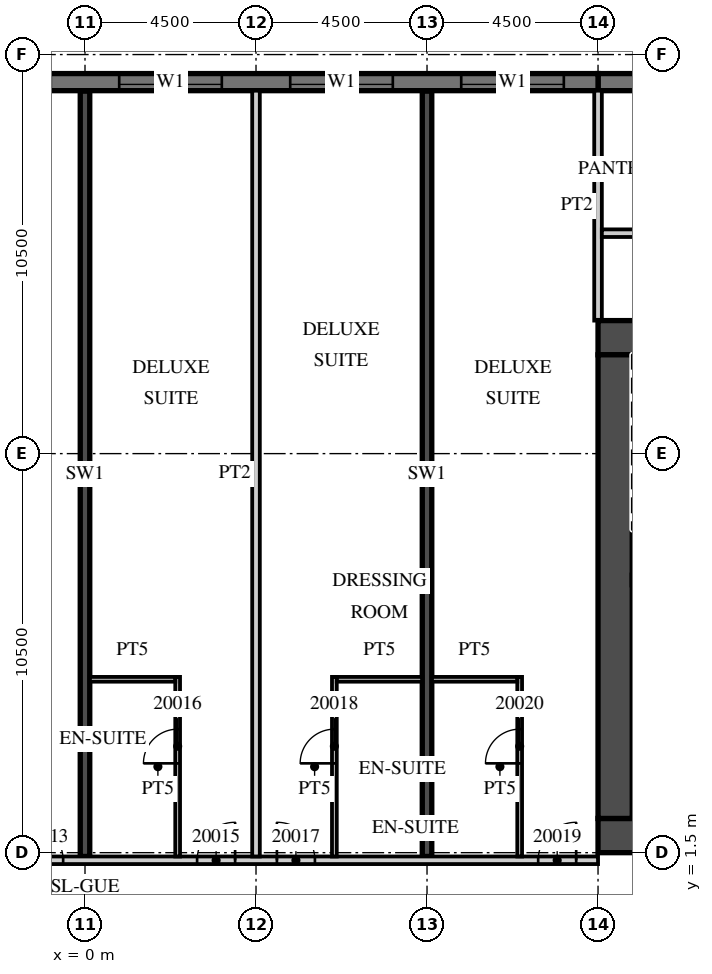
"""IFC4 building model, lengths in metres.
Left out: names, types, materials, properties, quantities, classifications, styles, units other than length and angle.
Written with IfcOpenShell. Run it as: python <this file> out.ifc"""

import sys

from ifc_helpers import new_model, si_unit, direction, frame, frame_2d, origin, place, context, subcontext, project, spatial, rectangle, extrude, element, fill, save


model = new_model("IFC4")
c1 = context("Model", 3, precision=1e-05, world=origin(), true_north=direction((0.0, 1.0)))
c2 = subcontext(c1, "Body", "Model", "MODEL_VIEW")
j1 = project(units=[si_unit("LENGTHUNIT", "METRE"), si_unit("PLANEANGLEUNIT", "RADIAN")], contexts=[c1])
p1 = place(None, origin())
s1 = spatial("IfcSite", under=j1, at=p1, CompositionType="ELEMENT")
p2 = place(p1, origin())
s2 = spatial("IfcBuilding", under=s1, at=p2, CompositionType="ELEMENT")
p3 = place(p2, frame((0.0, 0.0, 96.3)))
s3 = spatial("IfcBuildingStorey", under=s2, at=p3, CompositionType="ELEMENT", Elevation=96.3)
for number, where, z_axis, x_axis in (
    (1, (0.0, 1.4, 0.0), (0.0, 0.0, 1.0), (0.0, 1.0, 0.0)),
    (2, (9.0, 1.4, 0.0), (0.0, 0.0, 1.0), (0.0, 1.0, 0.0)),
):
    element("IfcWall", number, at=place(p3, frame(where, z_axis=z_axis, x_axis=x_axis)), inside=s3, PredefinedType="SHEAR", context=c2, shape_type="SweptSolid", body=[
        extrude(rectangle(XDim=20.14, YDim=0.25, at=frame_2d((10.07, 0.0))), origin(), (0.0, 0.0, 1.0), 3.0),
    ])
p4 = place(p3, frame((31.5, 21.775, 0.0), z_axis=(0.0, 0.0, 1.0), x_axis=(-1.0, 0.0, 0.0)))
e3 = element("IfcWall", 3, at=p4, inside=s3, PredefinedType="SOLIDWALL", context=c2, shape_type="SweptSolid", body=[
    extrude(rectangle(XDim=18.0, YDim=0.45, at=frame_2d((9.0, 0.0))), origin(), (0.0, 0.0, 1.0), 3.0),
])
p5 = place(p3, frame((13.5, 21.775, 0.0), z_axis=(0.0, 0.0, 1.0), x_axis=(-1.0, 0.0, 0.0)))
e4 = element("IfcWall", 4, at=p5, inside=s3, PredefinedType="SOLIDWALL", context=c2, shape_type="SweptSolid", body=[
    extrude(rectangle(XDim=54.5, YDim=0.45, at=frame_2d((27.25, 0.0))), origin(), (0.0, 0.0, 1.0), 3.0),
])
p6 = place(p5, frame((0.9, 0.0, 0.45)))
e5 = element("IfcOpeningElement", 5, at=p6, cuts=e4, PredefinedType="OPENING", context=c2, shape_type="SweptSolid", body=[
    extrude(rectangle(XDim=2.7, YDim=2.25, at=frame_2d((1.35, 1.125))), frame((0.0, 0.235, 0.0), z_axis=(0.0, -1.0, 0.0), x_axis=(1.0, 0.0, 0.0)), (0.0, 0.0, 1.0), 0.47),
])
p7 = place(p5, frame((5.4, 0.0, 0.45)))
e6 = element("IfcOpeningElement", 6, at=p7, cuts=e4, PredefinedType="OPENING", context=c2, shape_type="SweptSolid", body=[
    extrude(rectangle(XDim=2.7, YDim=2.25, at=frame_2d((1.35, 1.125))), frame((0.0, 0.235, 0.0), z_axis=(0.0, -1.0, 0.0), x_axis=(1.0, 0.0, 0.0)), (0.0, 0.0, 1.0), 0.47),
])
p8 = place(p5, frame((9.9, 0.0, 0.45)))
e7 = element("IfcOpeningElement", 7, at=p8, cuts=e4, PredefinedType="OPENING", context=c2, shape_type="SweptSolid", body=[
    extrude(rectangle(XDim=2.7, YDim=2.25, at=frame_2d((1.35, 1.125))), frame((0.0, 0.235, 0.0), z_axis=(0.0, -1.0, 0.0), x_axis=(1.0, 0.0, 0.0)), (0.0, 0.0, 1.0), 0.47),
])
p9 = place(p5, frame((14.4, 0.0, 0.45)))
e8 = element("IfcOpeningElement", 8, at=p9, cuts=e4, PredefinedType="OPENING", context=c2, shape_type="SweptSolid", body=[
    extrude(rectangle(XDim=2.7, YDim=2.25, at=frame_2d((1.35, 1.125))), frame((0.0, 0.235, 0.0), z_axis=(0.0, -1.0, 0.0), x_axis=(1.0, 0.0, 0.0)), (0.0, 0.0, 1.0), 0.47),
])
p10 = place(p5, frame((18.9, 0.0, 0.45)))
e9 = element("IfcOpeningElement", 9, at=p10, cuts=e4, PredefinedType="OPENING", context=c2, shape_type="SweptSolid", body=[
    extrude(rectangle(XDim=2.7, YDim=2.25, at=frame_2d((1.35, 1.125))), frame((0.0, 0.235, 0.0), z_axis=(0.0, -1.0, 0.0), x_axis=(1.0, 0.0, 0.0)), (0.0, 0.0, 1.0), 0.47),
])
p11 = place(p5, frame((23.4, 0.0, 0.45)))
e10 = element("IfcOpeningElement", 10, at=p11, cuts=e4, PredefinedType="OPENING", context=c2, shape_type="SweptSolid", body=[
    extrude(rectangle(XDim=2.7, YDim=2.25, at=frame_2d((1.35, 1.125))), frame((0.0, 0.235, 0.0), z_axis=(0.0, -1.0, 0.0), x_axis=(1.0, 0.0, 0.0)), (0.0, 0.0, 1.0), 0.47),
])
p12 = place(p5, frame((27.9, 0.0, 0.45)))
e11 = element("IfcOpeningElement", 11, at=p12, cuts=e4, PredefinedType="OPENING", context=c2, shape_type="SweptSolid", body=[
    extrude(rectangle(XDim=2.7, YDim=2.25, at=frame_2d((1.35, 1.125))), frame((0.0, 0.235, 0.0), z_axis=(0.0, -1.0, 0.0), x_axis=(1.0, 0.0, 0.0)), (0.0, 0.0, 1.0), 0.47),
])
p13 = place(p5, frame((32.4, 0.0, 0.45)))
e12 = element("IfcOpeningElement", 12, at=p13, cuts=e4, PredefinedType="OPENING", context=c2, shape_type="SweptSolid", body=[
    extrude(rectangle(XDim=2.7, YDim=2.25, at=frame_2d((1.35, 1.125))), frame((0.0, 0.235, 0.0), z_axis=(0.0, -1.0, 0.0), x_axis=(1.0, 0.0, 0.0)), (0.0, 0.0, 1.0), 0.47),
])
p14 = place(p5, frame((36.9, 0.0, 0.45)))
e13 = element("IfcOpeningElement", 13, at=p14, cuts=e4, PredefinedType="OPENING", context=c2, shape_type="SweptSolid", body=[
    extrude(rectangle(XDim=2.7, YDim=2.25, at=frame_2d((1.35, 1.125))), frame((0.0, 0.235, 0.0), z_axis=(0.0, -1.0, 0.0), x_axis=(1.0, 0.0, 0.0)), (0.0, 0.0, 1.0), 0.47),
])
p15 = place(p5, frame((41.4, 0.0, 0.45)))
e14 = element("IfcOpeningElement", 14, at=p15, cuts=e4, PredefinedType="OPENING", context=c2, shape_type="SweptSolid", body=[
    extrude(rectangle(XDim=2.7, YDim=2.25, at=frame_2d((1.35, 1.125))), frame((0.0, 0.235, 0.0), z_axis=(0.0, -1.0, 0.0), x_axis=(1.0, 0.0, 0.0)), (0.0, 0.0, 1.0), 0.47),
])
p16 = place(p5, frame((45.9, 0.0, 0.45)))
e15 = element("IfcOpeningElement", 15, at=p16, cuts=e4, PredefinedType="OPENING", context=c2, shape_type="SweptSolid", body=[
    extrude(rectangle(XDim=2.7, YDim=2.25, at=frame_2d((1.35, 1.125))), frame((0.0, 0.235, 0.0), z_axis=(0.0, -1.0, 0.0), x_axis=(1.0, 0.0, 0.0)), (0.0, 0.0, 1.0), 0.47),
])
p17 = place(p5, frame((50.4, 0.0, 0.45)))
e16 = element("IfcOpeningElement", 16, at=p17, cuts=e4, PredefinedType="OPENING", context=c2, shape_type="SweptSolid", body=[
    extrude(rectangle(XDim=2.7, YDim=2.25, at=frame_2d((1.35, 1.125))), frame((0.0, 0.235, 0.0), z_axis=(0.0, -1.0, 0.0), x_axis=(1.0, 0.0, 0.0)), (0.0, 0.0, 1.0), 0.47),
])
p18 = place(p3, frame((13.5, 15.5, 0.0), z_axis=(0.0, 0.0, 1.0), x_axis=(0.0, 1.0, 0.0)))
e17 = element("IfcWall", 17, at=p18, inside=s3, PredefinedType="PARTITIONING", context=c2, shape_type="SweptSolid", body=[
    extrude(rectangle(XDim=6.05, YDim=0.2, at=frame_2d((3.025, 0.0))), origin(), (0.0, 0.0, 1.0), 3.0),
])
p19 = place(p3, frame((-44.55, 1.3, 0.0), z_axis=(0.0, 0.0, 1.0), x_axis=(1.0, 0.0, 0.0)))
e18 = element("IfcWall", 18, at=p19, inside=s3, PredefinedType="PARTITIONING", context=c2, shape_type="SweptSolid", body=[
    extrude(rectangle(XDim=58.05, YDim=0.2, at=frame_2d((29.025, 0.0))), origin(), (0.0, 0.0, 1.0), 3.0),
])
p20 = place(p19, frame((0.525, 0.0, 0.0)))
e19 = element("IfcOpeningElement", 19, at=p20, cuts=e18, PredefinedType="OPENING", context=c2, shape_type="SweptSolid", body=[
    extrude(rectangle(XDim=1.0, YDim=2.1, at=frame_2d((0.5, 1.05))), frame((0.0, 0.11, 0.0), z_axis=(0.0, -1.0, 0.0), x_axis=(1.0, 0.0, 0.0)), (0.0, 0.0, 1.0), 0.22),
])
p21 = place(p19, frame((4.625, 0.0, 0.0)))
e20 = element("IfcOpeningElement", 20, at=p21, cuts=e18, PredefinedType="OPENING", context=c2, shape_type="SweptSolid", body=[
    extrude(rectangle(XDim=1.0, YDim=2.1, at=frame_2d((0.5, 1.05))), frame((0.0, 0.11, 0.0), z_axis=(0.0, -1.0, 0.0), x_axis=(1.0, 0.0, 0.0)), (0.0, 0.0, 1.0), 0.22),
])
p22 = place(p19, frame((10.987, 0.0, 0.0)))
e21 = element("IfcOpeningElement", 21, at=p22, cuts=e18, PredefinedType="OPENING", context=c2, shape_type="SweptSolid", body=[
    extrude(rectangle(XDim=1.2, YDim=2.1, at=frame_2d((0.6, 1.05))), frame((0.0, 0.11, 0.0), z_axis=(0.0, -1.0, 0.0), x_axis=(1.0, 0.0, 0.0)), (0.0, 0.0, 1.0), 0.22),
])
p23 = place(p19, frame((22.912, 0.0, 0.0)))
e22 = element("IfcOpeningElement", 22, at=p23, cuts=e18, PredefinedType="OPENING", context=c2, shape_type="SweptSolid", body=[
    extrude(rectangle(XDim=1.2, YDim=2.1, at=frame_2d((0.6, 1.05))), frame((0.0, 0.11, 0.0), z_axis=(0.0, -1.0, 0.0), x_axis=(1.0, 0.0, 0.0)), (0.0, 0.0, 1.0), 0.22),
])
p24 = place(p19, frame((28.987, 0.0, 0.0)))
e23 = element("IfcOpeningElement", 23, at=p24, cuts=e18, PredefinedType="OPENING", context=c2, shape_type="SweptSolid", body=[
    extrude(rectangle(XDim=1.2, YDim=2.1, at=frame_2d((0.6, 1.05))), frame((0.0, 0.11, 0.0), z_axis=(0.0, -1.0, 0.0), x_axis=(1.0, 0.0, 0.0)), (0.0, 0.0, 1.0), 0.22),
])
p25 = place(p19, frame((36.125, 0.0, 0.0)))
e24 = element("IfcOpeningElement", 24, at=p25, cuts=e18, PredefinedType="OPENING", context=c2, shape_type="SweptSolid", body=[
    extrude(rectangle(XDim=1.0, YDim=2.1, at=frame_2d((0.5, 1.05))), frame((0.0, 0.11, 0.0), z_axis=(0.0, -1.0, 0.0), x_axis=(1.0, 0.0, 0.0)), (0.0, 0.0, 1.0), 0.22),
])
p26 = place(p19, frame((42.975, 0.0, 0.0)))
e25 = element("IfcOpeningElement", 25, at=p26, cuts=e18, PredefinedType="OPENING", context=c2, shape_type="SweptSolid", body=[
    extrude(rectangle(XDim=1.0, YDim=2.1, at=frame_2d((0.5, 1.05))), frame((0.0, 0.11, 0.0), z_axis=(0.0, -1.0, 0.0), x_axis=(1.0, 0.0, 0.0)), (0.0, 0.0, 1.0), 0.22),
])
p27 = place(p19, frame((47.5, 0.0, 0.0)))
e26 = element("IfcOpeningElement", 26, at=p27, cuts=e18, PredefinedType="OPENING", context=c2, shape_type="SweptSolid", body=[
    extrude(rectangle(XDim=1.0, YDim=2.1, at=frame_2d((0.5, 1.05))), frame((0.0, 0.11, 0.0), z_axis=(0.0, -1.0, 0.0), x_axis=(1.0, 0.0, 0.0)), (0.0, 0.0, 1.0), 0.22),
])
p28 = place(p19, frame((49.6, 0.0, 0.0)))
e27 = element("IfcOpeningElement", 27, at=p28, cuts=e18, PredefinedType="OPENING", context=c2, shape_type="SweptSolid", body=[
    extrude(rectangle(XDim=1.0, YDim=2.1, at=frame_2d((0.5, 1.05))), frame((0.0, 0.11, 0.0), z_axis=(0.0, -1.0, 0.0), x_axis=(1.0, 0.0, 0.0)), (0.0, 0.0, 1.0), 0.22),
])
p29 = place(p19, frame((56.475, 0.0, 0.0)))
e28 = element("IfcOpeningElement", 28, at=p29, cuts=e18, PredefinedType="OPENING", context=c2, shape_type="SweptSolid", body=[
    extrude(rectangle(XDim=1.0, YDim=2.1, at=frame_2d((0.5, 1.05))), frame((0.0, 0.11, 0.0), z_axis=(0.0, -1.0, 0.0), x_axis=(1.0, 0.0, 0.0)), (0.0, 0.0, 1.0), 0.22),
])
p30 = place(p3, frame((4.5, 1.4, 0.0), z_axis=(0.0, 0.0, 1.0), x_axis=(0.0, 1.0, 0.0)))
e29 = element("IfcWall", 29, at=p30, inside=s3, PredefinedType="PARTITIONING", context=c2, shape_type="SweptSolid", body=[
    extrude(rectangle(XDim=20.15, YDim=0.2, at=frame_2d((10.075, 0.0))), origin(), (0.0, 0.0, 1.0), 3.0),
])
p31 = place(p3, frame((2.438, 1.4, 0.0), z_axis=(0.0, 0.0, 1.0), x_axis=(0.0, 1.0, 0.0)))
e30 = element("IfcWall", 30, at=p31, inside=s3, PredefinedType="PARTITIONING", context=c2, shape_type="SweptSolid", body=[
    extrude(rectangle(XDim=4.725, YDim=0.125, at=frame_2d((2.363, 0.0))), origin(), (0.0, 0.0, 1.0), 3.0),
])
p32 = place(p31, frame((2.45, 0.0, 0.0)))
e31 = element("IfcOpeningElement", 31, at=p32, cuts=e30, PredefinedType="OPENING", context=c2, shape_type="SweptSolid", body=[
    extrude(rectangle(XDim=0.9, YDim=2.1, at=frame_2d((0.45, 1.05))), frame((0.0, 0.073, 0.0), z_axis=(0.0, -1.0, 0.0), x_axis=(1.0, 0.0, 0.0)), (0.0, 0.0, 1.0), 0.145),
])
p33 = place(p3, frame((0.125, 6.062, 0.0), z_axis=(0.0, 0.0, 1.0), x_axis=(1.0, 0.0, 0.0)))
e32 = element("IfcWall", 32, at=p33, inside=s3, PredefinedType="PARTITIONING", context=c2, shape_type="SweptSolid", body=[
    extrude(rectangle(XDim=2.25, YDim=0.125, at=frame_2d((1.125, 0.0))), origin(), (0.0, 0.0, 1.0), 3.0),
])
p34 = place(p3, frame((6.562, 1.4, 0.0), z_axis=(0.0, 0.0, 1.0), x_axis=(0.0, 1.0, 0.0)))
e33 = element("IfcWall", 33, at=p34, inside=s3, PredefinedType="PARTITIONING", context=c2, shape_type="SweptSolid", body=[
    extrude(rectangle(XDim=4.725, YDim=0.125, at=frame_2d((2.363, 0.0))), origin(), (0.0, 0.0, 1.0), 3.0),
])
p35 = place(p34, frame((2.45, 0.0, 0.0)))
e34 = element("IfcOpeningElement", 34, at=p35, cuts=e33, PredefinedType="OPENING", context=c2, shape_type="SweptSolid", body=[
    extrude(rectangle(XDim=0.9, YDim=2.1, at=frame_2d((0.45, 1.05))), frame((0.0, 0.073, 0.0), z_axis=(0.0, -1.0, 0.0), x_axis=(1.0, 0.0, 0.0)), (0.0, 0.0, 1.0), 0.145),
])
p36 = place(p3, frame((6.625, 6.062, 0.0), z_axis=(0.0, 0.0, 1.0), x_axis=(1.0, 0.0, 0.0)))
e35 = element("IfcWall", 35, at=p36, inside=s3, PredefinedType="PARTITIONING", context=c2, shape_type="SweptSolid", body=[
    extrude(rectangle(XDim=2.25, YDim=0.125, at=frame_2d((1.125, 0.0))), origin(), (0.0, 0.0, 1.0), 3.0),
])
p37 = place(p3, frame((11.438, 1.4, 0.0), z_axis=(0.0, 0.0, 1.0), x_axis=(0.0, 1.0, 0.0)))
e36 = element("IfcWall", 36, at=p37, inside=s3, PredefinedType="PARTITIONING", context=c2, shape_type="SweptSolid", body=[
    extrude(rectangle(XDim=4.725, YDim=0.125, at=frame_2d((2.363, 0.0))), origin(), (0.0, 0.0, 1.0), 3.0),
])
p38 = place(p37, frame((2.45, 0.0, 0.0)))
e37 = element("IfcOpeningElement", 37, at=p38, cuts=e36, PredefinedType="OPENING", context=c2, shape_type="SweptSolid", body=[
    extrude(rectangle(XDim=0.9, YDim=2.1, at=frame_2d((0.45, 1.05))), frame((0.0, 0.073, 0.0), z_axis=(0.0, -1.0, 0.0), x_axis=(1.0, 0.0, 0.0)), (0.0, 0.0, 1.0), 0.145),
])
p39 = place(p3, frame((9.125, 6.062, 0.0), z_axis=(0.0, 0.0, 1.0), x_axis=(1.0, 0.0, 0.0)))
e38 = element("IfcWall", 38, at=p39, inside=s3, PredefinedType="PARTITIONING", context=c2, shape_type="SweptSolid", body=[
    extrude(rectangle(XDim=2.25, YDim=0.125, at=frame_2d((1.125, 0.0))), origin(), (0.0, 0.0, 1.0), 3.0),
])
p40 = place(p3, frame((13.5, 1.95, 0.0), z_axis=(0.0, 0.0, 1.0), x_axis=(1.0, 0.0, 0.0)))
e39 = element("IfcWall", 39, at=p40, inside=s3, PredefinedType="SHEAR", context=c2, shape_type="SweptSolid", body=[
    extrude(rectangle(XDim=18.0, YDim=0.9, at=frame_2d((9.0, 0.0))), origin(), (0.0, 0.0, 1.0), 3.0),
])
p41 = place(p40, frame((1.475, 0.0, 0.0)))
e40 = element("IfcOpeningElement", 40, at=p41, cuts=e39, PredefinedType="OPENING", context=c2, shape_type="SweptSolid", body=[
    extrude(rectangle(XDim=1.8, YDim=2.1, at=frame_2d((0.9, 1.05))), frame((0.0, 0.46, 0.0), z_axis=(0.0, -1.0, 0.0), x_axis=(1.0, 0.0, 0.0)), (0.0, 0.0, 1.0), 0.92),
])
p42 = place(p3, frame((13.5, 15.05, 0.0), z_axis=(0.0, 0.0, 1.0), x_axis=(1.0, 0.0, 0.0)))
e41 = element("IfcWall", 41, at=p42, inside=s3, PredefinedType="SHEAR", context=c2, shape_type="SweptSolid", body=[
    extrude(rectangle(XDim=6.8, YDim=0.9, at=frame_2d((3.4, 0.0))), origin(), (0.0, 0.0, 1.0), 3.0),
])
p43 = place(p42, frame((4.725, 0.0, 0.0)))
e42 = element("IfcOpeningElement", 42, at=p43, cuts=e41, PredefinedType="OPENING", context=c2, shape_type="SweptSolid", body=[
    extrude(rectangle(XDim=1.2, YDim=2.1, at=frame_2d((0.6, 1.05))), frame((0.0, 0.46, 0.0), z_axis=(0.0, -1.0, 0.0), x_axis=(1.0, 0.0, 0.0)), (0.0, 0.0, 1.0), 0.92),
])
p44 = place(p3, frame((13.95, 2.4, 0.0), z_axis=(0.0, 0.0, 1.0), x_axis=(0.0, 1.0, 0.0)))
e43 = element("IfcWall", 43, at=p44, inside=s3, PredefinedType="SHEAR", context=c2, shape_type="SweptSolid", body=[
    extrude(rectangle(XDim=12.2, YDim=0.9, at=frame_2d((6.1, 0.0))), origin(), (0.0, 0.0, 1.0), 3.0),
])
p45 = place(p3, frame((13.6, 17.8, 0.0), z_axis=(0.0, 0.0, 1.0), x_axis=(1.0, 0.0, 0.0)))
e44 = element("IfcWall", 44, at=p45, inside=s3, PredefinedType="PARTITIONING", context=c2, shape_type="SweptSolid", body=[
    extrude(rectangle(XDim=30.95, YDim=0.2, at=frame_2d((15.475, 0.0))), origin(), (0.0, 0.0, 1.0), 3.0),
])
p46 = place(p45, frame((15.012, 0.0, 0.0)))
e45 = element("IfcOpeningElement", 45, at=p46, cuts=e44, PredefinedType="OPENING", context=c2, shape_type="SweptSolid", body=[
    extrude(rectangle(XDim=0.9, YDim=2.1, at=frame_2d((0.45, 1.05))), frame((0.0, 0.11, 0.0), z_axis=(0.0, -1.0, 0.0), x_axis=(1.0, 0.0, 0.0)), (0.0, 0.0, 1.0), 0.22),
])
p47 = place(p45, frame((6.712, 0.0, 0.0)))
e46 = element("IfcOpeningElement", 46, at=p47, cuts=e44, PredefinedType="OPENING", context=c2, shape_type="SweptSolid", body=[
    extrude(rectangle(XDim=0.9, YDim=2.1, at=frame_2d((0.45, 1.05))), frame((0.0, 0.11, 0.0), z_axis=(0.0, -1.0, 0.0), x_axis=(1.0, 0.0, 0.0)), (0.0, 0.0, 1.0), 0.22),
])
p48 = place(p6, origin())
e47 = element("IfcWindow", 47, at=p48, inside=s3, PartitioningType="SINGLE_PANEL", PredefinedType="WINDOW", context=c2, shape_type="SweptSolid", body=[
    extrude(rectangle(XDim=2.7, YDim=2.25, at=frame_2d((1.35, 1.125))), frame((0.0, 0.09, 0.0), z_axis=(0.0, -1.0, 0.0), x_axis=(1.0, 0.0, 0.0)), (0.0, 0.0, 1.0), 0.06),
])
fill(e5, e47)
p49 = place(p7, origin())
e48 = element("IfcWindow", 48, at=p49, inside=s3, PartitioningType="SINGLE_PANEL", PredefinedType="WINDOW", context=c2, shape_type="SweptSolid", body=[
    extrude(rectangle(XDim=2.7, YDim=2.25, at=frame_2d((1.35, 1.125))), frame((0.0, 0.09, 0.0), z_axis=(0.0, -1.0, 0.0), x_axis=(1.0, 0.0, 0.0)), (0.0, 0.0, 1.0), 0.06),
])
fill(e6, e48)
p50 = place(p8, origin())
e49 = element("IfcWindow", 49, at=p50, inside=s3, PartitioningType="SINGLE_PANEL", PredefinedType="WINDOW", context=c2, shape_type="SweptSolid", body=[
    extrude(rectangle(XDim=2.7, YDim=2.25, at=frame_2d((1.35, 1.125))), frame((0.0, 0.09, 0.0), z_axis=(0.0, -1.0, 0.0), x_axis=(1.0, 0.0, 0.0)), (0.0, 0.0, 1.0), 0.06),
])
fill(e7, e49)
p51 = place(p26, origin())
e50 = element("IfcDoor", 50, at=p51, inside=s3, OperationType="SINGLE_SWING_LEFT", PredefinedType="DOOR", context=c2, shape_type="SweptSolid", body=[
    extrude(rectangle(XDim=1.0, YDim=2.1, at=frame_2d((0.5, 1.05))), frame((0.0, 0.025, 0.0), z_axis=(0.0, -1.0, 0.0), x_axis=(1.0, 0.0, 0.0)), (0.0, 0.0, 1.0), 0.05),
])
fill(e25, e50)
p52 = place(p27, origin())
e51 = element("IfcDoor", 51, at=p52, inside=s3, OperationType="SINGLE_SWING_RIGHT", PredefinedType="DOOR", context=c2, shape_type="SweptSolid", body=[
    extrude(rectangle(XDim=1.0, YDim=2.1, at=frame_2d((0.5, 1.05))), frame((0.0, 0.025, 0.0), z_axis=(0.0, -1.0, 0.0), x_axis=(1.0, 0.0, 0.0)), (0.0, 0.0, 1.0), 0.05),
])
fill(e26, e51)
p53 = place(p32, origin())
e52 = element("IfcDoor", 52, at=p53, inside=s3, OperationType="SINGLE_SWING_LEFT", PredefinedType="DOOR", context=c2, shape_type="SweptSolid", body=[
    extrude(rectangle(XDim=0.9, YDim=2.1, at=frame_2d((0.45, 1.05))), frame((0.0, 0.025, 0.0), z_axis=(0.0, -1.0, 0.0), x_axis=(1.0, 0.0, 0.0)), (0.0, 0.0, 1.0), 0.05),
])
fill(e31, e52)
p54 = place(p28, origin())
e53 = element("IfcDoor", 53, at=p54, inside=s3, OperationType="SINGLE_SWING_LEFT", PredefinedType="DOOR", context=c2, shape_type="SweptSolid", body=[
    extrude(rectangle(XDim=1.0, YDim=2.1, at=frame_2d((0.5, 1.05))), frame((0.0, 0.025, 0.0), z_axis=(0.0, -1.0, 0.0), x_axis=(1.0, 0.0, 0.0)), (0.0, 0.0, 1.0), 0.05),
])
fill(e27, e53)
p55 = place(p35, origin())
e54 = element("IfcDoor", 54, at=p55, inside=s3, OperationType="SINGLE_SWING_LEFT", PredefinedType="DOOR", context=c2, shape_type="SweptSolid", body=[
    extrude(rectangle(XDim=0.9, YDim=2.1, at=frame_2d((0.45, 1.05))), frame((0.0, 0.025, 0.0), z_axis=(0.0, -1.0, 0.0), x_axis=(1.0, 0.0, 0.0)), (0.0, 0.0, 1.0), 0.05),
])
fill(e34, e54)
p56 = place(p29, origin())
e55 = element("IfcDoor", 55, at=p56, inside=s3, OperationType="SINGLE_SWING_RIGHT", PredefinedType="DOOR", context=c2, shape_type="SweptSolid", body=[
    extrude(rectangle(XDim=1.0, YDim=2.1, at=frame_2d((0.5, 1.05))), frame((0.0, 0.025, 0.0), z_axis=(0.0, -1.0, 0.0), x_axis=(1.0, 0.0, 0.0)), (0.0, 0.0, 1.0), 0.05),
])
fill(e28, e55)
p57 = place(p38, origin())
e56 = element("IfcDoor", 56, at=p57, inside=s3, OperationType="SINGLE_SWING_LEFT", PredefinedType="DOOR", context=c2, shape_type="SweptSolid", body=[
    extrude(rectangle(XDim=0.9, YDim=2.1, at=frame_2d((0.45, 1.05))), frame((0.0, 0.025, 0.0), z_axis=(0.0, -1.0, 0.0), x_axis=(1.0, 0.0, 0.0)), (0.0, 0.0, 1.0), 0.05),
])
fill(e37, e56)
save(model, sys.argv[1])
